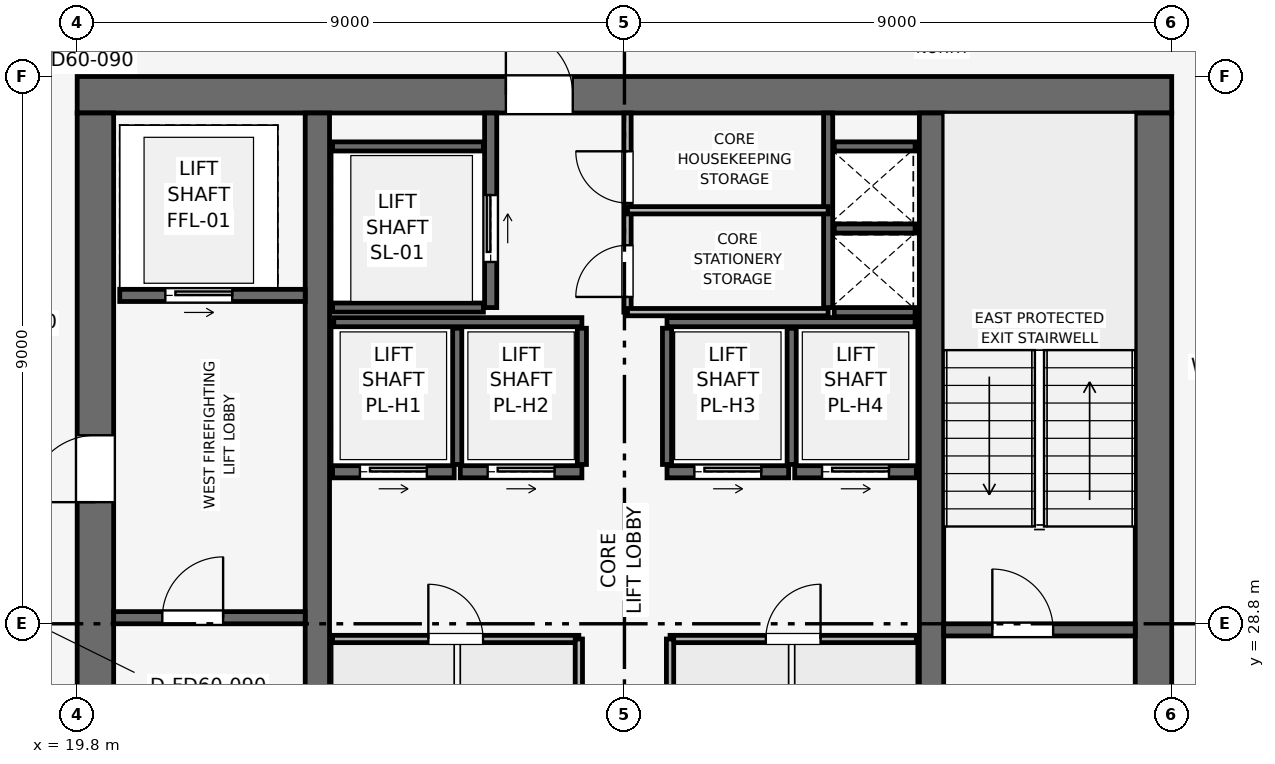
"""IFC4 building model, lengths in metres.
Left out: names, types, materials, properties, quantities, classifications, styles, units other than length and angle.
Written with IfcOpenShell. Run it as: python <this file> out.ifc"""

import sys

from ifc_helpers import new_model, si_unit, direction, frame, frame_2d, origin, place, context, subcontext, project, spatial, rectangle, extrude, element, fill, save


model = new_model("IFC4")
c1 = context("Model", 3, precision=1e-05, world=origin(), true_north=direction((0.0, 1.0)))
c2 = subcontext(c1, "Body", "Model", "MODEL_VIEW")
j1 = project(units=[si_unit("LENGTHUNIT", "METRE"), si_unit("PLANEANGLEUNIT", "RADIAN")], contexts=[c1])
p1 = place(None, origin())
s1 = spatial("IfcSite", under=j1, at=p1, CompositionType="ELEMENT")
p2 = place(p1, origin())
s2 = spatial("IfcBuilding", under=s1, at=p2, CompositionType="ELEMENT")
p3 = place(p2, frame((0.0, 0.0, 306.75)))
s3 = spatial("IfcBuildingStorey", under=s2, at=p3, CompositionType="ELEMENT", Elevation=306.75)
p4 = place(p3, frame((19.8, 37.5, 0.0), z_axis=(0.0, 0.0, 1.0), x_axis=(1.0, 0.0, 0.0)))
e1 = element("IfcWall", 1, at=p4, inside=s3, PredefinedType="SHEAR", context=c2, shape_type="SweptSolid", body=[
    extrude(rectangle(XDim=18.0, YDim=0.6, at=frame_2d((9.0, 0.0))), origin(), (0.0, 0.0, 1.0), 3.75),
])
p5 = place(p4, frame((7.05, 0.0, 0.0)))
e2 = element("IfcOpeningElement", 2, at=p5, cuts=e1, PredefinedType="OPENING", context=c2, shape_type="SweptSolid", body=[
    extrude(rectangle(XDim=1.1, YDim=2.15, at=frame_2d((0.55, 1.075))), frame((0.0, 0.31, 0.0), z_axis=(0.0, -1.0, 0.0), x_axis=(1.0, 0.0, 0.0)), (0.0, 0.0, 1.0), 0.62),
])
p6 = place(p3, frame((20.1, 20.4, 0.0), z_axis=(0.0, 0.0, 1.0), x_axis=(0.0, 1.0, 0.0)))
e3 = element("IfcWall", 3, at=p6, inside=s3, PredefinedType="SHEAR", context=c2, shape_type="SweptSolid", body=[
    extrude(rectangle(XDim=16.8, YDim=0.6, at=frame_2d((8.4, 0.0))), origin(), (0.0, 0.0, 1.0), 3.75),
])
p7 = place(p6, frame((10.4, 0.0, 0.0)))
e4 = element("IfcOpeningElement", 4, at=p7, cuts=e3, PredefinedType="OPENING", context=c2, shape_type="SweptSolid", body=[
    extrude(rectangle(XDim=1.1, YDim=2.15, at=frame_2d((0.55, 1.075))), frame((0.0, 0.31, 0.0), z_axis=(0.0, -1.0, 0.0), x_axis=(1.0, 0.0, 0.0)), (0.0, 0.0, 1.0), 0.62),
])
p8 = place(p3, frame((37.5, 20.4, 0.0), z_axis=(0.0, 0.0, 1.0), x_axis=(0.0, 1.0, 0.0)))
e5 = element("IfcWall", 5, at=p8, inside=s3, PredefinedType="SHEAR", context=c2, shape_type="SweptSolid", body=[
    extrude(rectangle(XDim=16.8, YDim=0.6, at=frame_2d((8.4, 0.0))), origin(), (0.0, 0.0, 1.0), 3.75),
])
p9 = place(p8, frame((4.9, 0.0, 0.0)))
e6 = element("IfcOpeningElement", 6, at=p9, cuts=e5, PredefinedType="OPENING", context=c2, shape_type="SweptSolid", body=[
    extrude(rectangle(XDim=1.1, YDim=2.15, at=frame_2d((0.55, 1.075))), frame((0.0, 0.31, 0.0), z_axis=(0.0, -1.0, 0.0), x_axis=(1.0, 0.0, 0.0)), (0.0, 0.0, 1.0), 0.62),
])
for number, where, z_axis, x_axis in (
    (7, (23.75, 20.4, 0.0), (0.0, 0.0, 1.0), (0.0, 1.0, 0.0)),
    (8, (33.85, 20.4, 0.0), (0.0, 0.0, 1.0), (0.0, 1.0, 0.0)),
):
    element("IfcWall", number, at=place(p3, frame(where, z_axis=z_axis, x_axis=x_axis)), inside=s3, PredefinedType="SHEAR", context=c2, shape_type="SweptSolid", body=[
        extrude(rectangle(XDim=16.8, YDim=0.4, at=frame_2d((8.4, 0.0))), origin(), (0.0, 0.0, 1.0), 3.75),
    ])
p10 = place(p3, frame((20.4, 28.9, 0.0), z_axis=(0.0, 0.0, 1.0), x_axis=(1.0, 0.0, 0.0)))
e9 = element("IfcWall", 9, at=p10, inside=s3, PredefinedType="SHEAR", context=c2, shape_type="SweptSolid", body=[
    extrude(rectangle(XDim=3.15, YDim=0.2, at=frame_2d((1.575, 0.0))), origin(), (0.0, 0.0, 1.0), 3.51),
])
p11 = place(p10, frame((0.8, 0.0, 0.0)))
e10 = element("IfcOpeningElement", 10, at=p11, cuts=e9, PredefinedType="OPENING", context=c2, shape_type="SweptSolid", body=[
    extrude(rectangle(XDim=1.0, YDim=2.1, at=frame_2d((0.5, 1.05))), frame((0.0, 0.11, 0.0), z_axis=(0.0, -1.0, 0.0), x_axis=(1.0, 0.0, 0.0)), (0.0, 0.0, 1.0), 0.22),
])
p12 = place(p3, frame((34.05, 28.7, 0.0), z_axis=(0.0, 0.0, 1.0), x_axis=(1.0, 0.0, 0.0)))
e11 = element("IfcWall", 11, at=p12, inside=s3, PredefinedType="SHEAR", context=c2, shape_type="SweptSolid", body=[
    extrude(rectangle(XDim=3.15, YDim=0.2, at=frame_2d((1.575, 0.0))), origin(), (0.0, 0.0, 1.0), 3.51),
])
p13 = place(p12, frame((0.8, 0.0, 0.0)))
e12 = element("IfcOpeningElement", 12, at=p13, cuts=e11, PredefinedType="OPENING", context=c2, shape_type="SweptSolid", body=[
    extrude(rectangle(XDim=1.0, YDim=2.1, at=frame_2d((0.5, 1.05))), frame((0.0, 0.11, 0.0), z_axis=(0.0, -1.0, 0.0), x_axis=(1.0, 0.0, 0.0)), (0.0, 0.0, 1.0), 0.22),
])
p14 = place(p3, frame((32.15, 34.0, 0.0), z_axis=(0.0, 0.0, 1.0), x_axis=(0.0, 1.0, 0.0)))
e13 = element("IfcWall", 13, at=p14, inside=s3, PredefinedType="SHEAR", context=c2, shape_type="SweptSolid", body=[
    extrude(rectangle(XDim=3.2, YDim=0.15, at=frame_2d((1.6, 0.0))), origin(), (0.0, 0.0, 1.0), 3.51),
])
for number, where, z_axis, x_axis in (
    (14, (32.25, 33.925, 0.0), (0.0, 0.0, 1.0), (1.0, 0.0, 0.0)),
    (15, (32.25, 35.3, 0.0), (0.0, 0.0, 1.0), (1.0, 0.0, 0.0)),
):
    element("IfcWall", number, at=place(p3, frame(where, z_axis=z_axis, x_axis=x_axis)), inside=s3, PredefinedType="SHEAR", context=c2, shape_type="SweptSolid", body=[
        extrude(rectangle(XDim=1.33, YDim=0.15, at=frame_2d((0.665, 0.0))), origin(), (0.0, 0.0, 1.0), 3.51),
    ])
p15 = place(p3, frame((20.5, 34.2, 0.0), z_axis=(0.0, 0.0, 1.0), x_axis=(1.0, 0.0, 0.0)))
e16 = element("IfcWall", 16, at=p15, inside=s3, PredefinedType="SHEAR", context=c2, shape_type="SweptSolid", body=[
    extrude(rectangle(XDim=3.05, YDim=0.2, at=frame_2d((1.525, 0.0))), origin(), (0.0, 0.0, 1.0), 3.51),
])
p16 = place(p15, frame((0.75, 0.0, 0.0)))
e17 = element("IfcOpeningElement", 17, at=p16, cuts=e16, PredefinedType="OPENING", context=c2, shape_type="SweptSolid", body=[
    extrude(rectangle(XDim=1.1, YDim=2.15, at=frame_2d((0.55, 1.075))), frame((0.0, 0.11, 0.0), z_axis=(0.0, -1.0, 0.0), x_axis=(1.0, 0.0, 0.0)), (0.0, 0.0, 1.0), 0.22),
])
p17 = place(p3, frame((26.6, 34.0, 0.0), z_axis=(0.0, 0.0, 1.0), x_axis=(0.0, 1.0, 0.0)))
e18 = element("IfcWall", 18, at=p17, inside=s3, PredefinedType="SHEAR", context=c2, shape_type="SweptSolid", body=[
    extrude(rectangle(XDim=3.2, YDim=0.2, at=frame_2d((1.6, 0.0))), origin(), (0.0, 0.0, 1.0), 3.51),
])
p18 = place(p17, frame((0.75, 0.0, 0.0)))
e19 = element("IfcOpeningElement", 19, at=p18, cuts=e18, PredefinedType="OPENING", context=c2, shape_type="SweptSolid", body=[
    extrude(rectangle(XDim=1.1, YDim=2.15, at=frame_2d((0.55, 1.075))), frame((0.0, 0.11, 0.0), z_axis=(0.0, -1.0, 0.0), x_axis=(1.0, 0.0, 0.0)), (0.0, 0.0, 1.0), 0.22),
])
for number, where, z_axis, x_axis in (
    (20, (24.0, 34.0, 0.0), (0.0, 0.0, 1.0), (1.0, 0.0, 0.0)),
    (21, (24.0, 36.65, 0.0), (0.0, 0.0, 1.0), (1.0, 0.0, 0.0)),
):
    element("IfcWall", number, at=place(p3, frame(where, z_axis=z_axis, x_axis=x_axis)), inside=s3, PredefinedType="SHEAR", context=c2, shape_type="SweptSolid", body=[
        extrude(rectangle(XDim=2.48, YDim=0.15, at=frame_2d((1.24, 0.0))), origin(), (0.0, 0.0, 1.0), 3.51),
    ])
p19 = place(p3, frame((24.0, 31.3, 0.0), z_axis=(0.0, 0.0, 1.0), x_axis=(1.0, 0.0, 0.0)))
e22 = element("IfcWall", 22, at=p19, inside=s3, PredefinedType="SHEAR", context=c2, shape_type="SweptSolid", body=[
    extrude(rectangle(XDim=2.0, YDim=0.2, at=frame_2d((1.0, 0.0))), origin(), (0.0, 0.0, 1.0), 3.51),
])
p20 = place(p19, frame((0.45, 0.0, 0.0)))
e23 = element("IfcOpeningElement", 23, at=p20, cuts=e22, PredefinedType="OPENING", context=c2, shape_type="SweptSolid", body=[
    extrude(rectangle(XDim=1.1, YDim=2.15, at=frame_2d((0.55, 1.075))), frame((0.0, 0.11, 0.0), z_axis=(0.0, -1.0, 0.0), x_axis=(1.0, 0.0, 0.0)), (0.0, 0.0, 1.0), 0.22),
])
p21 = place(p3, frame((26.1, 31.3, 0.0), z_axis=(0.0, 0.0, 1.0), x_axis=(1.0, 0.0, 0.0)))
e24 = element("IfcWall", 24, at=p21, inside=s3, PredefinedType="SHEAR", context=c2, shape_type="SweptSolid", body=[
    extrude(rectangle(XDim=2.0, YDim=0.2, at=frame_2d((1.0, 0.0))), origin(), (0.0, 0.0, 1.0), 3.51),
])
p22 = place(p21, frame((0.45, 0.0, 0.0)))
e25 = element("IfcOpeningElement", 25, at=p22, cuts=e24, PredefinedType="OPENING", context=c2, shape_type="SweptSolid", body=[
    extrude(rectangle(XDim=1.1, YDim=2.15, at=frame_2d((0.55, 1.075))), frame((0.0, 0.11, 0.0), z_axis=(0.0, -1.0, 0.0), x_axis=(1.0, 0.0, 0.0)), (0.0, 0.0, 1.0), 0.22),
])
p23 = place(p3, frame((29.5, 31.3, 0.0), z_axis=(0.0, 0.0, 1.0), x_axis=(1.0, 0.0, 0.0)))
e26 = element("IfcWall", 26, at=p23, inside=s3, PredefinedType="SHEAR", context=c2, shape_type="SweptSolid", body=[
    extrude(rectangle(XDim=2.0, YDim=0.2, at=frame_2d((1.0, 0.0))), origin(), (0.0, 0.0, 1.0), 3.51),
])
p24 = place(p23, frame((0.45, 0.0, 0.0)))
e27 = element("IfcOpeningElement", 27, at=p24, cuts=e26, PredefinedType="OPENING", context=c2, shape_type="SweptSolid", body=[
    extrude(rectangle(XDim=1.1, YDim=2.15, at=frame_2d((0.55, 1.075))), frame((0.0, 0.11, 0.0), z_axis=(0.0, -1.0, 0.0), x_axis=(1.0, 0.0, 0.0)), (0.0, 0.0, 1.0), 0.22),
])
p25 = place(p3, frame((31.6, 31.3, 0.0), z_axis=(0.0, 0.0, 1.0), x_axis=(1.0, 0.0, 0.0)))
e28 = element("IfcWall", 28, at=p25, inside=s3, PredefinedType="SHEAR", context=c2, shape_type="SweptSolid", body=[
    extrude(rectangle(XDim=2.0, YDim=0.2, at=frame_2d((1.0, 0.0))), origin(), (0.0, 0.0, 1.0), 3.51),
])
p26 = place(p25, frame((0.45, 0.0, 0.0)))
e29 = element("IfcOpeningElement", 29, at=p26, cuts=e28, PredefinedType="OPENING", context=c2, shape_type="SweptSolid", body=[
    extrude(rectangle(XDim=1.1, YDim=2.15, at=frame_2d((0.55, 1.075))), frame((0.0, 0.11, 0.0), z_axis=(0.0, -1.0, 0.0), x_axis=(1.0, 0.0, 0.0)), (0.0, 0.0, 1.0), 0.22),
])
p27 = place(p3, frame((32.25, 36.65, 0.0), z_axis=(0.0, 0.0, 1.0), x_axis=(1.0, 0.0, 0.0)))
e30 = element("IfcWall", 30, at=p27, inside=s3, PredefinedType="SHEAR", context=c2, shape_type="SweptSolid", body=[
    extrude(rectangle(XDim=1.33, YDim=0.15, at=frame_2d((0.665, 0.0))), origin(), (0.0, 0.0, 1.0), 3.51),
])
for number, where, z_axis, x_axis in (
    (31, (24.02, 33.76, 0.0), (0.0, 0.0, 1.0), (1.0, 0.0, 0.0)),
    (32, (29.5, 33.76, 0.0), (0.0, 0.0, 1.0), (1.0, 0.0, 0.0)),
):
    element("IfcWall", number, at=place(p3, frame(where, z_axis=z_axis, x_axis=x_axis)), inside=s3, PredefinedType="SHEAR", context=c2, shape_type="SweptSolid", body=[
        extrude(rectangle(XDim=4.08, YDim=0.15, at=frame_2d((2.04, 0.0))), origin(), (0.0, 0.0, 1.0), 3.51),
    ])
for number, where, z_axis, x_axis in (
    (33, (26.05, 31.42, 0.0), (0.0, 0.0, 1.0), (0.0, 1.0, 0.0)),
    (34, (28.1, 31.42, 0.0), (0.0, 0.0, 1.0), (0.0, 1.0, 0.0)),
    (35, (29.5, 31.42, 0.0), (0.0, 0.0, 1.0), (0.0, 1.0, 0.0)),
    (36, (31.55, 31.42, 0.0), (0.0, 0.0, 1.0), (0.0, 1.0, 0.0)),
):
    element("IfcWall", number, at=place(p3, frame(where, z_axis=z_axis, x_axis=x_axis)), inside=s3, PredefinedType="SHEAR", context=c2, shape_type="SweptSolid", body=[
        extrude(rectangle(XDim=2.24, YDim=0.15, at=frame_2d((1.12, 0.0))), origin(), (0.0, 0.0, 1.0), 3.51),
    ])
p28 = place(p3, frame((28.85, 33.925, 0.0), z_axis=(0.0, 0.0, 1.0), x_axis=(0.0, 1.0, 0.0)))
e37 = element("IfcWall", 37, at=p28, inside=s3, PredefinedType="PARTITIONING", context=c2, shape_type="SweptSolid", body=[
    extrude(rectangle(XDim=3.275, YDim=0.12, at=frame_2d((1.637, 0.0))), origin(), (0.0, 0.0, 1.0), 3.51),
])
p29 = place(p28, frame((0.25, 0.0, 0.0)))
e38 = element("IfcOpeningElement", 38, at=p29, cuts=e37, PredefinedType="OPENING", context=c2, shape_type="SweptSolid", body=[
    extrude(rectangle(XDim=0.85, YDim=2.1, at=frame_2d((0.425, 1.05))), frame((0.0, 0.07, 0.0), z_axis=(0.0, -1.0, 0.0), x_axis=(1.0, 0.0, 0.0)), (0.0, 0.0, 1.0), 0.14),
])
p30 = place(p28, frame((1.795, 0.0, 0.0)))
e39 = element("IfcOpeningElement", 39, at=p30, cuts=e37, PredefinedType="OPENING", context=c2, shape_type="SweptSolid", body=[
    extrude(rectangle(XDim=0.85, YDim=2.1, at=frame_2d((0.425, 1.05))), frame((0.0, 0.07, 0.0), z_axis=(0.0, -1.0, 0.0), x_axis=(1.0, 0.0, 0.0)), (0.0, 0.0, 1.0), 0.14),
])
for number, where, z_axis, x_axis in (
    (40, (28.85, 35.6, 0.0), (0.0, 0.0, 1.0), (1.0, 0.0, 0.0)),
    (41, (28.85, 33.925, 0.0), (0.0, 0.0, 1.0), (1.0, 0.0, 0.0)),
):
    element("IfcWall", number, at=place(p3, frame(where, z_axis=z_axis, x_axis=x_axis)), inside=s3, PredefinedType="PARTITIONING", context=c2, shape_type="SweptSolid", body=[
        extrude(rectangle(XDim=3.3, YDim=0.12, at=frame_2d((1.65, 0.0))), origin(), (0.0, 0.0, 1.0), 3.51),
    ])
p31 = place(p3, frame((24.0, 28.55, 0.0), z_axis=(0.0, 0.0, 1.0), x_axis=(1.0, 0.0, 0.0)))
e42 = element("IfcWall", 42, at=p31, inside=s3, PredefinedType="PARTITIONING", context=c2, shape_type="SweptSolid", body=[
    extrude(rectangle(XDim=4.05, YDim=0.12, at=frame_2d((2.025, 0.0))), origin(), (0.0, 0.0, 1.0), 3.51),
])
p32 = place(p31, frame((1.575, 0.0, 0.0)))
e43 = element("IfcOpeningElement", 43, at=p32, cuts=e42, PredefinedType="OPENING", context=c2, shape_type="SweptSolid", body=[
    extrude(rectangle(XDim=0.9, YDim=2.1, at=frame_2d((0.45, 1.05))), frame((0.0, 0.07, 0.0), z_axis=(0.0, -1.0, 0.0), x_axis=(1.0, 0.0, 0.0)), (0.0, 0.0, 1.0), 0.14),
])
p33 = place(p3, frame((28.05, 20.4, 0.0), z_axis=(0.0, 0.0, 1.0), x_axis=(0.0, 1.0, 0.0)))
e44 = element("IfcWall", 44, at=p33, inside=s3, PredefinedType="PARTITIONING", context=c2, shape_type="SweptSolid", body=[
    extrude(rectangle(XDim=8.15, YDim=0.12, at=frame_2d((4.075, 0.0))), origin(), (0.0, 0.0, 1.0), 3.51),
])
p34 = place(p3, frame((29.55, 28.55, 0.0), z_axis=(0.0, 0.0, 1.0), x_axis=(1.0, 0.0, 0.0)))
e45 = element("IfcWall", 45, at=p34, inside=s3, PredefinedType="PARTITIONING", context=c2, shape_type="SweptSolid", body=[
    extrude(rectangle(XDim=4.05, YDim=0.12, at=frame_2d((2.025, 0.0))), origin(), (0.0, 0.0, 1.0), 3.51),
])
p35 = place(p34, frame((1.575, 0.0, 0.0)))
e46 = element("IfcOpeningElement", 46, at=p35, cuts=e45, PredefinedType="OPENING", context=c2, shape_type="SweptSolid", body=[
    extrude(rectangle(XDim=0.9, YDim=2.1, at=frame_2d((0.45, 1.05))), frame((0.0, 0.07, 0.0), z_axis=(0.0, -1.0, 0.0), x_axis=(1.0, 0.0, 0.0)), (0.0, 0.0, 1.0), 0.14),
])
p36 = place(p3, frame((29.55, 20.4, 0.0), z_axis=(0.0, 0.0, 1.0), x_axis=(0.0, 1.0, 0.0)))
e47 = element("IfcWall", 47, at=p36, inside=s3, PredefinedType="PARTITIONING", context=c2, shape_type="SweptSolid", body=[
    extrude(rectangle(XDim=8.15, YDim=0.12, at=frame_2d((4.075, 0.0))), origin(), (0.0, 0.0, 1.0), 3.51),
])
p37 = place(p11, origin())
e48 = element("IfcDoor", 48, at=p37, inside=s3, OperationType="SINGLE_SWING_RIGHT", PredefinedType="DOOR", context=c2, shape_type="SweptSolid", body=[
    extrude(rectangle(XDim=1.0, YDim=2.1, at=frame_2d((0.5, 1.05))), frame((0.0, 0.025, 0.0), z_axis=(0.0, -1.0, 0.0), x_axis=(1.0, 0.0, 0.0)), (0.0, 0.0, 1.0), 0.05),
])
fill(e10, e48)
p38 = place(p13, origin())
e49 = element("IfcDoor", 49, at=p38, inside=s3, OperationType="SINGLE_SWING_LEFT", PredefinedType="DOOR", context=c2, shape_type="SweptSolid", body=[
    extrude(rectangle(XDim=1.0, YDim=2.1, at=frame_2d((0.5, 1.05))), frame((0.0, 0.025, 0.0), z_axis=(0.0, -1.0, 0.0), x_axis=(1.0, 0.0, 0.0)), (0.0, 0.0, 1.0), 0.05),
])
fill(e12, e49)
p39 = place(p16, origin())
e50 = element("IfcDoor", 50, at=p39, inside=s3, OperationType="SLIDING_TO_RIGHT", PredefinedType="DOOR", context=c2, shape_type="SweptSolid", body=[
    extrude(rectangle(XDim=1.1, YDim=2.15, at=frame_2d((0.55, 1.075))), frame((0.0, 0.025, 0.0), z_axis=(0.0, -1.0, 0.0), x_axis=(1.0, 0.0, 0.0)), (0.0, 0.0, 1.0), 0.05),
])
fill(e17, e50)
p40 = place(p18, origin())
e51 = element("IfcDoor", 51, at=p40, inside=s3, OperationType="SLIDING_TO_RIGHT", PredefinedType="DOOR", context=c2, shape_type="SweptSolid", body=[
    extrude(rectangle(XDim=1.1, YDim=2.15, at=frame_2d((0.55, 1.075))), frame((0.0, 0.025, 0.0), z_axis=(0.0, -1.0, 0.0), x_axis=(1.0, 0.0, 0.0)), (0.0, 0.0, 1.0), 0.05),
])
fill(e19, e51)
p41 = place(p20, origin())
e52 = element("IfcDoor", 52, at=p41, inside=s3, OperationType="SLIDING_TO_RIGHT", PredefinedType="DOOR", context=c2, shape_type="SweptSolid", body=[
    extrude(rectangle(XDim=1.1, YDim=2.15, at=frame_2d((0.55, 1.075))), frame((0.0, 0.025, 0.0), z_axis=(0.0, -1.0, 0.0), x_axis=(1.0, 0.0, 0.0)), (0.0, 0.0, 1.0), 0.05),
])
fill(e23, e52)
p42 = place(p22, origin())
e53 = element("IfcDoor", 53, at=p42, inside=s3, OperationType="SLIDING_TO_RIGHT", PredefinedType="DOOR", context=c2, shape_type="SweptSolid", body=[
    extrude(rectangle(XDim=1.1, YDim=2.15, at=frame_2d((0.55, 1.075))), frame((0.0, 0.025, 0.0), z_axis=(0.0, -1.0, 0.0), x_axis=(1.0, 0.0, 0.0)), (0.0, 0.0, 1.0), 0.05),
])
fill(e25, e53)
p43 = place(p24, origin())
e54 = element("IfcDoor", 54, at=p43, inside=s3, OperationType="SLIDING_TO_RIGHT", PredefinedType="DOOR", context=c2, shape_type="SweptSolid", body=[
    extrude(rectangle(XDim=1.1, YDim=2.15, at=frame_2d((0.55, 1.075))), frame((0.0, 0.025, 0.0), z_axis=(0.0, -1.0, 0.0), x_axis=(1.0, 0.0, 0.0)), (0.0, 0.0, 1.0), 0.05),
])
fill(e27, e54)
p44 = place(p26, origin())
e55 = element("IfcDoor", 55, at=p44, inside=s3, OperationType="SLIDING_TO_RIGHT", PredefinedType="DOOR", context=c2, shape_type="SweptSolid", body=[
    extrude(rectangle(XDim=1.1, YDim=2.15, at=frame_2d((0.55, 1.075))), frame((0.0, 0.025, 0.0), z_axis=(0.0, -1.0, 0.0), x_axis=(1.0, 0.0, 0.0)), (0.0, 0.0, 1.0), 0.05),
])
fill(e29, e55)
p45 = place(p29, origin())
e56 = element("IfcDoor", 56, at=p45, inside=s3, OperationType="SINGLE_SWING_LEFT", PredefinedType="DOOR", context=c2, shape_type="SweptSolid", body=[
    extrude(rectangle(XDim=0.85, YDim=2.1, at=frame_2d((0.425, 1.05))), frame((0.0, 0.025, 0.0), z_axis=(0.0, -1.0, 0.0), x_axis=(1.0, 0.0, 0.0)), (0.0, 0.0, 1.0), 0.05),
])
fill(e38, e56)
p46 = place(p30, origin())
e57 = element("IfcDoor", 57, at=p46, inside=s3, OperationType="SINGLE_SWING_RIGHT", PredefinedType="DOOR", context=c2, shape_type="SweptSolid", body=[
    extrude(rectangle(XDim=0.85, YDim=2.1, at=frame_2d((0.425, 1.05))), frame((0.0, 0.025, 0.0), z_axis=(0.0, -1.0, 0.0), x_axis=(1.0, 0.0, 0.0)), (0.0, 0.0, 1.0), 0.05),
])
fill(e39, e57)
p47 = place(p32, origin())
e58 = element("IfcDoor", 58, at=p47, inside=s3, OperationType="SINGLE_SWING_LEFT", PredefinedType="DOOR", context=c2, shape_type="SweptSolid", body=[
    extrude(rectangle(XDim=0.9, YDim=2.1, at=frame_2d((0.45, 1.05))), frame((0.0, 0.025, 0.0), z_axis=(0.0, -1.0, 0.0), x_axis=(1.0, 0.0, 0.0)), (0.0, 0.0, 1.0), 0.05),
])
fill(e43, e58)
p48 = place(p35, origin())
e59 = element("IfcDoor", 59, at=p48, inside=s3, OperationType="SINGLE_SWING_RIGHT", PredefinedType="DOOR", context=c2, shape_type="SweptSolid", body=[
    extrude(rectangle(XDim=0.9, YDim=2.1, at=frame_2d((0.45, 1.05))), frame((0.0, 0.025, 0.0), z_axis=(0.0, -1.0, 0.0), x_axis=(1.0, 0.0, 0.0)), (0.0, 0.0, 1.0), 0.05),
])
fill(e46, e59)
p49 = place(p7, origin())
e60 = element("IfcDoor", 60, at=p49, inside=s3, OperationType="SINGLE_SWING_LEFT", PredefinedType="DOOR", context=c2, shape_type="SweptSolid", body=[
    extrude(rectangle(XDim=1.1, YDim=2.15, at=frame_2d((0.55, 1.075))), frame((0.0, 0.025, 0.0), z_axis=(0.0, -1.0, 0.0), x_axis=(1.0, 0.0, 0.0)), (0.0, 0.0, 1.0), 0.05),
])
fill(e4, e60)
p50 = place(p5, origin())
e61 = element("IfcDoor", 61, at=p50, inside=s3, OperationType="SINGLE_SWING_LEFT", PredefinedType="DOOR", context=c2, shape_type="SweptSolid", body=[
    extrude(rectangle(XDim=1.1, YDim=2.15, at=frame_2d((0.55, 1.075))), frame((0.0, 0.025, 0.0), z_axis=(0.0, -1.0, 0.0), x_axis=(1.0, 0.0, 0.0)), (0.0, 0.0, 1.0), 0.05),
])
fill(e2, e61)
save(model, sys.argv[1])
